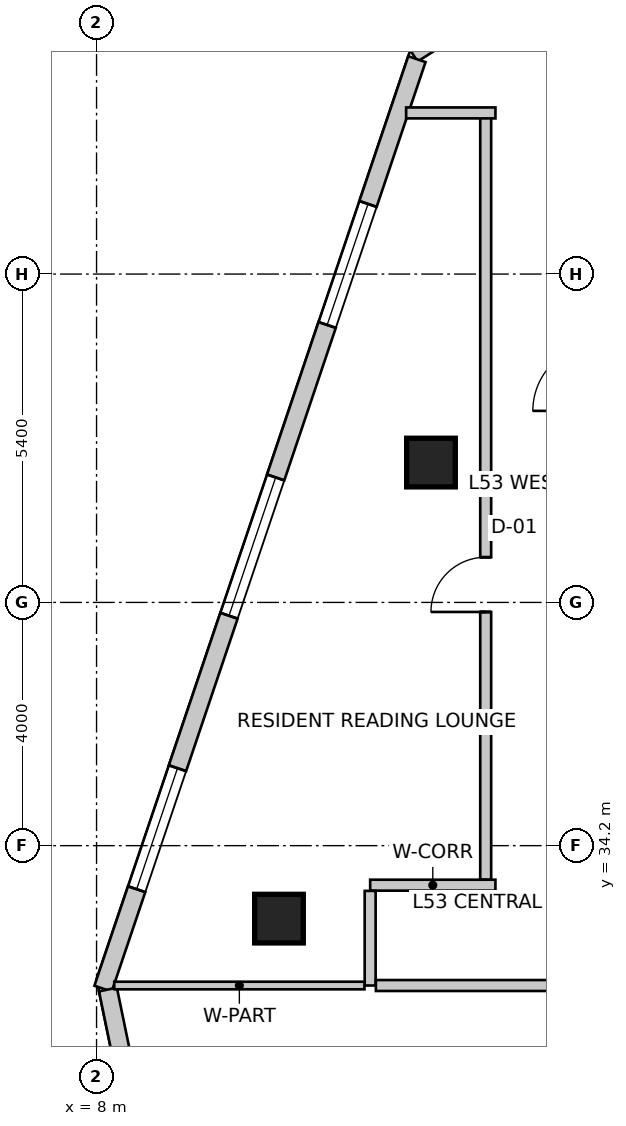
"""IFC4 building model, lengths in metres.
Left out: names, types, materials, properties, quantities, classifications, styles, units other than length and angle.
Written with IfcOpenShell. Run it as: python <this file> out.ifc"""

import sys

from ifc_helpers import new_model, si_unit, direction, frame, frame_2d, origin, origin_2d, place, context, subcontext, project, spatial, rectangle, extrude, source, transform, mapped, element, fill, save


model = new_model("IFC4")
c1 = context("Model", 3, precision=1e-05, world=origin(), true_north=direction((0.0, 1.0)))
c2 = subcontext(c1, "Body", "Model", "MODEL_VIEW")
j1 = project(units=[si_unit("LENGTHUNIT", "METRE"), si_unit("PLANEANGLEUNIT", "RADIAN")], contexts=[c1])
p1 = place(None, origin())
s1 = spatial("IfcSite", under=j1, at=p1, CompositionType="ELEMENT")
p2 = place(p1, origin())
s2 = spatial("IfcBuilding", under=s1, at=p2, CompositionType="ELEMENT")
p3 = place(p2, frame((0.0, 0.0, 211.4)))
s3 = spatial("IfcBuildingStorey", under=s2, at=p3, CompositionType="ELEMENT", Elevation=211.4)
m1 = source(origin(), c2, "Body", "SweptSolid", [
    extrude(rectangle(XDim=0.8, YDim=0.8, at=origin_2d()), origin(), (0.0, 0.0, 1.0), 3.5),
])
for number, where, z_axis, x_axis in (
    (1, (11.0, 33.0, 0.0), (0.0, 0.0, 1.0), (1.0, 0.0, 0.0)),
    (2, (13.5, 40.5, 0.0), (0.0, 0.0, 1.0), (1.0, 0.0, 0.0)),
):
    element("IfcColumn", number, at=place(p3, frame(where, z_axis=z_axis, x_axis=x_axis)), inside=s3, PredefinedType="COLUMN", context=c2, shape_type="MappedRepresentation", body=[
        mapped(m1, transform((0.0, 0.0, 0.0), scale=1.0)),
    ])
p4 = place(p3, frame((21.874, 52.742, 0.0), z_axis=(0.0, 0.0, 1.0), x_axis=(-0.84365659959, -0.536883173482, 0.0)))
e3 = element("IfcWall", 3, at=p4, inside=s3, PredefinedType="SOLIDWALL", context=c2, shape_type="SweptSolid", body=[
    extrude(rectangle(XDim=10.283, YDim=0.3, at=frame_2d((5.142, 0.0))), origin(), (0.0, 0.0, 1.0), 3.25),
])
m2 = source(origin(), c2, "Body", "SweptSolid", [
    extrude(rectangle(XDim=2.4, YDim=2.2, at=frame_2d((1.2, 1.1))), frame((0.0, 0.16, 0.0), z_axis=(0.0, -1.0, 0.0), x_axis=(1.0, 0.0, 0.0)), (0.0, 0.0, 1.0), 0.32),
])
p5 = place(p4, frame((3.307, 0.0, 0.85)))
e4 = element("IfcOpeningElement", 4, at=p5, cuts=e3, PredefinedType="OPENING", context=c2, shape_type="MappedRepresentation", body=[
    mapped(m2, transform((0.0, 0.0, 0.0), scale=1.0)),
])
p6 = place(p3, frame((13.269, 47.134, 0.0), z_axis=(0.0, 0.0, 1.0), x_axis=(-0.319920776449, -0.947444297464, 0.0)))
e5 = element("IfcWall", 5, at=p6, inside=s3, PredefinedType="SOLIDWALL", context=c2, shape_type="SweptSolid", body=[
    extrude(rectangle(XDim=16.133, YDim=0.3, at=frame_2d((8.067, 0.0))), origin(), (0.0, 0.0, 1.0), 3.25),
])
m3 = source(origin(), c2, "Body", "SweptSolid", [
    extrude(rectangle(XDim=2.1, YDim=2.0, at=frame_2d((1.05, 1.0))), frame((0.0, 0.16, 0.0), z_axis=(0.0, -1.0, 0.0), x_axis=(1.0, 0.0, 0.0)), (0.0, 0.0, 1.0), 0.32),
])
p7 = place(p6, frame((2.513, 0.0, 0.85)))
e6 = element("IfcOpeningElement", 6, at=p7, cuts=e5, PredefinedType="OPENING", context=c2, shape_type="MappedRepresentation", body=[
    mapped(m3, transform((0.0, 0.0, 0.0), scale=1.0)),
])
p8 = place(p6, frame((7.26, 0.0, 0.85)))
e7 = element("IfcOpeningElement", 7, at=p8, cuts=e5, PredefinedType="OPENING", context=c2, shape_type="MappedRepresentation", body=[
    mapped(m2, transform((0.0, 0.0, 0.0), scale=1.0)),
])
p9 = place(p6, frame((12.307, 0.0, 0.85)))
e8 = element("IfcOpeningElement", 8, at=p9, cuts=e5, PredefinedType="OPENING", context=c2, shape_type="MappedRepresentation", body=[
    mapped(m3, transform((0.0, 0.0, 0.0), scale=1.0)),
])
p10 = place(p3, frame((8.188, 31.834, 0.0), z_axis=(0.0, 0.0, 1.0), x_axis=(0.202303475707, -0.979322880217, 0.0)))
e9 = element("IfcWall", 9, at=p10, inside=s3, PredefinedType="SOLIDWALL", context=c2, shape_type="SweptSolid", body=[
    extrude(rectangle(XDim=15.766, YDim=0.3, at=frame_2d((7.883, 0.0))), origin(), (0.0, 0.0, 1.0), 3.25),
])
m4 = source(origin(), c2, "Body", "SweptSolid", [
    extrude(rectangle(XDim=1.6, YDim=2.15, at=frame_2d((0.8, 1.075))), frame((0.0, 0.16, 0.0), z_axis=(0.0, -1.0, 0.0), x_axis=(1.0, 0.0, 0.0)), (0.0, 0.0, 1.0), 0.32),
])
p11 = place(p10, frame((9.466, 0.0, 0.0)))
e10 = element("IfcOpeningElement", 10, at=p11, cuts=e9, PredefinedType="OPENING", context=c2, shape_type="MappedRepresentation", body=[
    mapped(m4, transform((0.0, 0.0, 0.0), scale=1.0)),
])
p12 = place(p10, frame((1.337, 0.0, 0.85)))
e11 = element("IfcOpeningElement", 11, at=p12, cuts=e9, PredefinedType="OPENING", context=c2, shape_type="MappedRepresentation", body=[
    mapped(m2, transform((0.0, 0.0, 0.0), scale=1.0)),
])
p13 = place(p10, frame((5.92, 0.0, 0.85)))
e12 = element("IfcOpeningElement", 12, at=p13, cuts=e9, PredefinedType="OPENING", context=c2, shape_type="MappedRepresentation", body=[
    mapped(m3, transform((0.0, 0.0, 0.0), scale=1.0)),
])
p14 = place(p10, frame((11.438, 0.0, 0.85)))
e13 = element("IfcOpeningElement", 13, at=p14, cuts=e9, PredefinedType="OPENING", context=c2, shape_type="MappedRepresentation", body=[
    mapped(m2, transform((0.0, 0.0, 0.0), scale=1.0)),
])
p15 = place(p3, frame((12.5, 33.55, 0.0), z_axis=(0.0, 0.0, 1.0), x_axis=(1.0, 0.0, 0.0)))
e14 = element("IfcWall", 14, at=p15, inside=s3, PredefinedType="PARTITIONING", context=c2, shape_type="SweptSolid", body=[
    extrude(rectangle(XDim=2.06, YDim=0.18, at=frame_2d((1.03, 0.0))), origin(), (0.0, 0.0, 1.0), 3.25),
])
p16 = place(p3, frame((12.5, 31.9, 0.0), z_axis=(0.0, 0.0, 1.0), x_axis=(0.0, 1.0, 0.0)))
e15 = element("IfcWall", 15, at=p16, inside=s3, PredefinedType="PARTITIONING", context=c2, shape_type="SweptSolid", body=[
    extrude(rectangle(XDim=1.556, YDim=0.18, at=frame_2d((0.778, 0.0))), origin(), (0.0, 0.0, 1.0), 2.934),
])
p17 = place(p3, frame((28.497, 31.9, 0.0), z_axis=(0.0, 0.0, 1.0), x_axis=(-1.0, 0.0, 0.0)))
e16 = element("IfcWall", 16, at=p17, inside=s3, PredefinedType="PARTITIONING", context=c2, shape_type="SweptSolid", body=[
    extrude(rectangle(XDim=15.903, YDim=0.18, at=frame_2d((7.952, 0.0))), origin(), (0.0, 0.0, 1.0), 2.934),
])
m5 = source(origin(), c2, "Body", "SweptSolid", [
    extrude(rectangle(XDim=1.6, YDim=2.15, at=frame_2d((0.8, 1.075))), frame((0.0, 0.1, 0.0), z_axis=(0.0, -1.0, 0.0), x_axis=(1.0, 0.0, 0.0)), (0.0, 0.0, 1.0), 0.2),
])
p18 = place(p17, frame((7.152, 0.0, 0.0)))
e17 = element("IfcOpeningElement", 17, at=p18, cuts=e16, PredefinedType="OPENING", context=c2, shape_type="MappedRepresentation", body=[
    mapped(m5, transform((0.0, 0.0, 0.0), scale=1.0)),
])
p19 = place(p3, frame((14.4, 33.644, 0.0), z_axis=(0.0, 0.0, 1.0), x_axis=(0.0, 1.0, 0.0)))
e18 = element("IfcWall", 18, at=p19, inside=s3, PredefinedType="PARTITIONING", context=c2, shape_type="SweptSolid", body=[
    extrude(rectangle(XDim=12.606, YDim=0.18, at=frame_2d((6.303, 0.0))), origin(), (0.0, 0.0, 1.0), 3.25),
])
m6 = source(origin(), c2, "Body", "SweptSolid", [
    extrude(rectangle(XDim=0.9, YDim=2.15, at=frame_2d((0.45, 1.075))), frame((0.0, 0.1, 0.0), z_axis=(0.0, -1.0, 0.0), x_axis=(1.0, 0.0, 0.0)), (0.0, 0.0, 1.0), 0.2),
])
p20 = place(p19, frame((4.399, 0.0, 0.0)))
e19 = element("IfcOpeningElement", 19, at=p20, cuts=e18, PredefinedType="OPENING", context=c2, shape_type="MappedRepresentation", body=[
    mapped(m6, transform((0.0, 0.0, 0.0), scale=1.0)),
])
p21 = place(p3, frame((14.56, 46.25, 0.0), z_axis=(0.0, 0.0, 1.0), x_axis=(-1.0, 0.0, 0.0)))
e20 = element("IfcWall", 20, at=p21, inside=s3, PredefinedType="PARTITIONING", context=c2, shape_type="SweptSolid", body=[
    extrude(rectangle(XDim=1.469, YDim=0.18, at=frame_2d((0.734, 0.0))), origin(), (0.0, 0.0, 1.0), 3.25),
])
p22 = place(p3, frame((12.406, 31.9, 0.0), z_axis=(0.0, 0.0, 1.0), x_axis=(-1.0, 0.0, 0.0)))
e21 = element("IfcWall", 21, at=p22, inside=s3, PredefinedType="PARTITIONING", context=c2, shape_type="SweptSolid", body=[
    extrude(rectangle(XDim=4.115, YDim=0.125, at=frame_2d((2.057, 0.0))), origin(), (0.0, 0.0, 1.0), 2.542),
])
m7 = source(origin(), c2, "Body", "SweptSolid", [
    extrude(rectangle(XDim=2.1, YDim=2.0, at=frame_2d((1.05, 1.0))), frame((0.0, -0.015, 0.0), z_axis=(0.0, -1.0, 0.0), x_axis=(1.0, 0.0, 0.0)), (0.0, 0.0, 1.0), 0.06),
])
p23 = place(p7, origin())
e22 = element("IfcWindow", 22, at=p23, inside=s3, PartitioningType="SINGLE_PANEL", PredefinedType="WINDOW", context=c2, shape_type="MappedRepresentation", body=[
    mapped(m7, transform((0.0, 0.0, 0.0), scale=1.0)),
])
fill(e6, e22)
m8 = source(origin(), c2, "Body", "SweptSolid", [
    extrude(rectangle(XDim=2.4, YDim=2.2, at=frame_2d((1.2, 1.1))), frame((0.0, -0.015, 0.0), z_axis=(0.0, -1.0, 0.0), x_axis=(1.0, 0.0, 0.0)), (0.0, 0.0, 1.0), 0.06),
])
p24 = place(p8, origin())
e23 = element("IfcWindow", 23, at=p24, inside=s3, PartitioningType="SINGLE_PANEL", PredefinedType="WINDOW", context=c2, shape_type="MappedRepresentation", body=[
    mapped(m8, transform((0.0, 0.0, 0.0), scale=1.0)),
])
fill(e7, e23)
p25 = place(p9, origin())
e24 = element("IfcWindow", 24, at=p25, inside=s3, PartitioningType="SINGLE_PANEL", PredefinedType="WINDOW", context=c2, shape_type="MappedRepresentation", body=[
    mapped(m7, transform((0.0, 0.0, 0.0), scale=1.0)),
])
fill(e8, e24)
m9 = source(origin(), c2, "Body", "SweptSolid", [
    extrude(rectangle(XDim=0.9, YDim=2.15, at=frame_2d((0.45, 1.075))), frame((0.0, 0.025, 0.0), z_axis=(0.0, -1.0, 0.0), x_axis=(1.0, 0.0, 0.0)), (0.0, 0.0, 1.0), 0.05),
])
p26 = place(p20, origin())
e25 = element("IfcDoor", 25, at=p26, inside=s3, OperationType="SINGLE_SWING_LEFT", PredefinedType="DOOR", context=c2, shape_type="MappedRepresentation", body=[
    mapped(m9, transform((0.0, 0.0, 0.0), scale=1.0)),
])
fill(e19, e25)
save(model, sys.argv[1])
